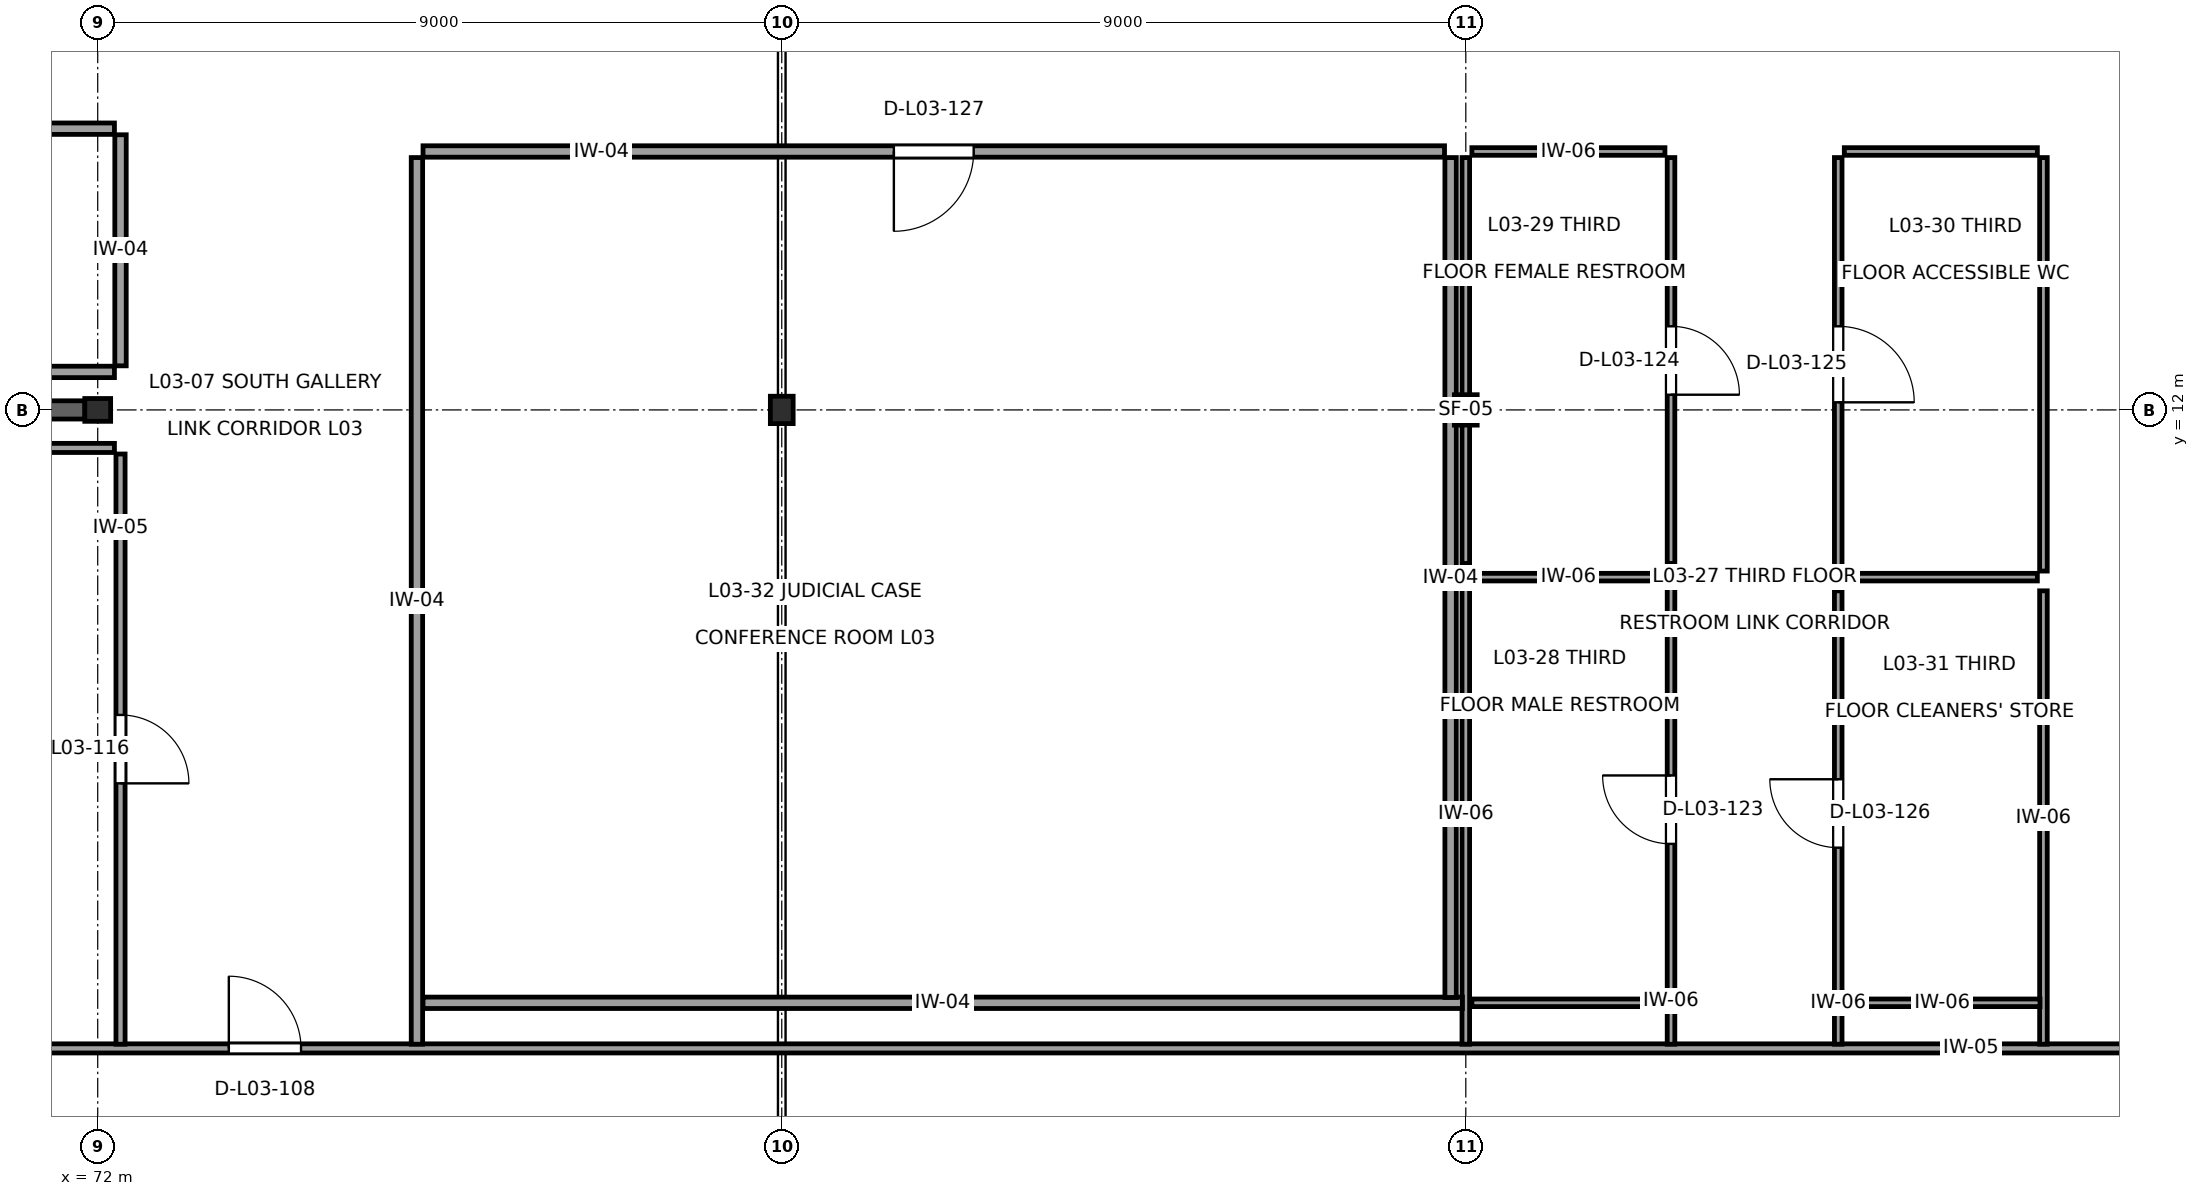
"""IFC4 building model, lengths in metres.
Left out: names, types, materials, properties, quantities, classifications, styles, units other than length and angle.
Written with IfcOpenShell. Run it as: python <this file> out.ifc"""

import sys

from ifc_helpers import new_model, si_unit, direction, frame, frame_2d, origin, origin_2d, place, context, subcontext, project, spatial, rectangle, i_section, extrude, element, fill, save


model = new_model("IFC4")
c1 = context("Model", 3, precision=1e-05, world=origin(), true_north=direction((0.0, 1.0)))
c2 = subcontext(c1, "Body", "Model", "MODEL_VIEW")
j1 = project(units=[si_unit("LENGTHUNIT", "METRE"), si_unit("PLANEANGLEUNIT", "RADIAN")], contexts=[c1])
p1 = place(None, origin())
s1 = spatial("IfcSite", under=j1, at=p1, CompositionType="ELEMENT")
p2 = place(p1, origin())
s2 = spatial("IfcBuilding", under=s1, at=p2, CompositionType="ELEMENT")
p3 = place(p2, frame((0.0, 0.0, 14.4)))
s3 = spatial("IfcBuildingStorey", under=s2, at=p3, CompositionType="ELEMENT", Elevation=14.4)
p4 = place(p3, frame((72.0, 12.0, 0.0), z_axis=(0.0, 0.0, 1.0), x_axis=(0.0, 1.0, 0.0)))
e1 = element("IfcColumn", 1, at=p4, inside=s3, PredefinedType="COLUMN", context=c2, shape_type="SweptSolid", body=[
    extrude(i_section(OverallWidth=0.3, OverallDepth=0.34, WebThickness=0.012, FlangeThickness=0.021, at=origin_2d()), origin(), (0.0, 0.0, 1.0), 4.5),
])
p5 = place(p3, frame((81.0, 12.0, 0.0), z_axis=(0.0, 0.0, 1.0), x_axis=(1.0, 0.0, 0.0)))
e2 = element("IfcColumn", 2, at=p5, inside=s3, PredefinedType="COLUMN", context=c2, shape_type="SweptSolid", body=[
    extrude(i_section(OverallWidth=0.3, OverallDepth=0.36, WebThickness=0.012, FlangeThickness=0.022, at=origin_2d()), origin(), (0.0, 0.0, 1.0), 4.5),
])
p6 = place(p3, frame((90.0, 12.0, 0.0), z_axis=(0.0, 0.0, 1.0), x_axis=(1.0, 0.0, 0.0)))
e3 = element("IfcColumn", 3, at=p6, inside=s3, PredefinedType="COLUMN", context=c2, shape_type="SweptSolid", body=[
    extrude(i_section(OverallWidth=0.3, OverallDepth=0.4, WebThickness=0.013, FlangeThickness=0.024, at=origin_2d()), origin(), (0.0, 0.0, 1.0), 4.5),
])
p7 = place(p3, frame((63.008, 12.0, 0.0), z_axis=(0.0, 0.0, 1.0), x_axis=(1.0, 0.0, 0.0)))
e4 = element("IfcWall", 4, at=p7, inside=s3, PredefinedType="SHEAR", context=c2, shape_type="SweptSolid", body=[
    extrude(rectangle(XDim=8.824, YDim=0.24, at=frame_2d((4.412, 0.0))), origin(), (0.0, 0.0, 1.0), 3.575),
])
p8 = place(p3, frame((53.87, 3.6, 0.0), z_axis=(0.0, 0.0, 1.0), x_axis=(1.0, 0.0, 0.0)))
e5 = element("IfcWall", 5, at=p8, inside=s3, PredefinedType="PARTITIONING", context=c2, shape_type="SweptSolid", body=[
    extrude(rectangle(XDim=63.25, YDim=0.12, at=frame_2d((31.625, 0.0))), origin(), (0.0, 0.0, 1.0), 4.14),
])
p9 = place(p8, frame((19.855, 0.0, 0.0)))
e6 = element("IfcOpeningElement", 6, at=p9, cuts=e5, PredefinedType="OPENING", context=c2, shape_type="SweptSolid", body=[
    extrude(rectangle(XDim=0.95, YDim=2.15, at=frame_2d((0.475, 1.075))), frame((0.0, 0.075, 0.0), z_axis=(0.0, -1.0, 0.0), x_axis=(1.0, 0.0, 0.0)), (0.0, 0.0, 1.0), 0.15),
])
p10 = place(p3, frame((62.795, 11.5, 0.0), z_axis=(0.0, 0.0, 1.0), x_axis=(1.0, 0.0, 0.0)))
e7 = element("IfcWall", 7, at=p10, inside=s3, PredefinedType="PARTITIONING", context=c2, shape_type="SweptSolid", body=[
    extrude(rectangle(XDim=9.425, YDim=0.12, at=frame_2d((4.712, 0.0))), origin(), (0.0, 0.0, 1.0), 4.14),
])
p11 = place(p3, frame((72.3, 11.42, 0.0), z_axis=(0.0, 0.0, 1.0), x_axis=(0.0, -1.0, 0.0)))
e8 = element("IfcWall", 8, at=p11, inside=s3, PredefinedType="PARTITIONING", context=c2, shape_type="SweptSolid", body=[
    extrude(rectangle(XDim=7.765, YDim=0.12, at=frame_2d((3.882, 0.0))), origin(), (0.0, 0.0, 1.0), 4.14),
])
p12 = place(p11, frame((3.433, 0.0, 0.0)))
e9 = element("IfcOpeningElement", 9, at=p12, cuts=e8, PredefinedType="OPENING", context=c2, shape_type="SweptSolid", body=[
    extrude(rectangle(XDim=0.9, YDim=2.1, at=frame_2d((0.45, 1.05))), frame((0.0, 0.075, 0.0), z_axis=(0.0, -1.0, 0.0), x_axis=(1.0, 0.0, 0.0)), (0.0, 0.0, 1.0), 0.15),
])
p13 = place(p3, frame((62.795, 15.7, 0.0), z_axis=(0.0, 0.0, 1.0), x_axis=(1.0, 0.0, 0.0)))
e10 = element("IfcWall", 10, at=p13, inside=s3, PredefinedType="PARTITIONING", context=c2, shape_type="SweptSolid", body=[
    extrude(rectangle(XDim=9.425, YDim=0.15, at=frame_2d((4.712, 0.0))), origin(), (0.0, 0.0, 1.0), 4.14),
])
p14 = place(p13, frame((4.187, 0.0, 0.0)))
e11 = element("IfcOpeningElement", 11, at=p14, cuts=e10, PredefinedType="OPENING", context=c2, shape_type="SweptSolid", body=[
    extrude(rectangle(XDim=1.05, YDim=2.25, at=frame_2d((0.525, 1.125))), frame((0.0, 0.09, 0.0), z_axis=(0.0, -1.0, 0.0), x_axis=(1.0, 0.0, 0.0)), (0.0, 0.0, 1.0), 0.18),
])
p15 = place(p3, frame((72.3, 15.62, 0.0), z_axis=(0.0, 0.0, 1.0), x_axis=(0.0, -1.0, 0.0)))
e12 = element("IfcWall", 12, at=p15, inside=s3, PredefinedType="PARTITIONING", context=c2, shape_type="SweptSolid", body=[
    extrude(rectangle(XDim=3.04, YDim=0.15, at=frame_2d((1.52, 0.0))), origin(), (0.0, 0.0, 1.0), 4.14),
])
p16 = place(p3, frame((72.22, 12.5, 0.0), z_axis=(0.0, 0.0, 1.0), x_axis=(-1.0, 0.0, 0.0)))
e13 = element("IfcWall", 13, at=p16, inside=s3, PredefinedType="PARTITIONING", context=c2, shape_type="SweptSolid", body=[
    extrude(rectangle(XDim=9.425, YDim=0.15, at=frame_2d((4.712, 0.0))), origin(), (0.0, 0.0, 1.0), 4.14),
])
p17 = place(p3, frame((92.62, 4.2, 0.0), z_axis=(0.0, 0.0, 1.0), x_axis=(-1.0, 0.0, 0.0)))
e14 = element("IfcWall", 14, at=p17, inside=s3, PredefinedType="PARTITIONING", context=c2, shape_type="SweptSolid", body=[
    extrude(rectangle(XDim=2.54, YDim=0.1, at=frame_2d((1.27, 0.0))), origin(), (0.0, 0.0, 1.0), 4.14),
])
p18 = place(p3, frame((90.0, 3.655, 0.0), z_axis=(0.0, 0.0, 1.0), x_axis=(0.0, 1.0, 0.0)))
e15 = element("IfcWall", 15, at=p18, inside=s3, PredefinedType="PARTITIONING", context=c2, shape_type="SweptSolid", body=[
    extrude(rectangle(XDim=6.065, YDim=0.1, at=frame_2d((3.032, 0.0))), origin(), (0.0, 0.0, 1.0), 3.735),
])
p19 = place(p3, frame((90.08, 9.8, 0.0), z_axis=(0.0, 0.0, 1.0), x_axis=(1.0, 0.0, 0.0)))
e16 = element("IfcWall", 16, at=p19, inside=s3, PredefinedType="PARTITIONING", context=c2, shape_type="SweptSolid", body=[
    extrude(rectangle(XDim=2.54, YDim=0.1, at=frame_2d((1.27, 0.0))), origin(), (0.0, 0.0, 1.0), 4.14),
])
p20 = place(p3, frame((92.7, 9.72, 0.0), z_axis=(0.0, 0.0, 1.0), x_axis=(0.0, -1.0, 0.0)))
e17 = element("IfcWall", 17, at=p20, inside=s3, PredefinedType="PARTITIONING", context=c2, shape_type="SweptSolid", body=[
    extrude(rectangle(XDim=6.065, YDim=0.1, at=frame_2d((3.032, 0.0))), origin(), (0.0, 0.0, 1.0), 4.14),
])
p21 = place(p20, frame((2.529, 0.0, 0.0)))
e18 = element("IfcOpeningElement", 18, at=p21, cuts=e17, PredefinedType="OPENING", context=c2, shape_type="SweptSolid", body=[
    extrude(rectangle(XDim=0.9, YDim=2.05, at=frame_2d((0.45, 1.025))), frame((0.0, 0.065, 0.0), z_axis=(0.0, -1.0, 0.0), x_axis=(1.0, 0.0, 0.0)), (0.0, 0.0, 1.0), 0.13),
])
p22 = place(p3, frame((90.08, 15.4, 0.0), z_axis=(0.0, 0.0, 1.0), x_axis=(1.0, 0.0, 0.0)))
e19 = element("IfcWall", 19, at=p22, inside=s3, PredefinedType="PARTITIONING", context=c2, shape_type="SweptSolid", body=[
    extrude(rectangle(XDim=2.54, YDim=0.1, at=frame_2d((1.27, 0.0))), origin(), (0.0, 0.0, 1.0), 4.14),
])
p23 = place(p3, frame((92.7, 15.32, 0.0), z_axis=(0.0, 0.0, 1.0), x_axis=(0.0, -1.0, 0.0)))
e20 = element("IfcWall", 20, at=p23, inside=s3, PredefinedType="PARTITIONING", context=c2, shape_type="SweptSolid", body=[
    extrude(rectangle(XDim=5.34, YDim=0.1, at=frame_2d((2.67, 0.0))), origin(), (0.0, 0.0, 1.0), 4.14),
])
p24 = place(p23, frame((2.22, 0.0, 0.0)))
e21 = element("IfcOpeningElement", 21, at=p24, cuts=e20, PredefinedType="OPENING", context=c2, shape_type="SweptSolid", body=[
    extrude(rectangle(XDim=0.9, YDim=2.05, at=frame_2d((0.45, 1.025))), frame((0.0, 0.065, 0.0), z_axis=(0.0, -1.0, 0.0), x_axis=(1.0, 0.0, 0.0)), (0.0, 0.0, 1.0), 0.13),
])
p25 = place(p3, frame((90.0, 9.98, 0.0), z_axis=(0.0, 0.0, 1.0), x_axis=(0.0, 1.0, 0.0)))
e22 = element("IfcWall", 22, at=p25, inside=s3, PredefinedType="PARTITIONING", context=c2, shape_type="SweptSolid", body=[
    extrude(rectangle(XDim=5.34, YDim=0.1, at=frame_2d((2.67, 0.0))), origin(), (0.0, 0.0, 1.0), 3.735),
])
p26 = place(p3, frame((94.98, 15.4, 0.0), z_axis=(0.0, 0.0, 1.0), x_axis=(1.0, 0.0, 0.0)))
e23 = element("IfcWall", 23, at=p26, inside=s3, PredefinedType="PARTITIONING", context=c2, shape_type="SweptSolid", body=[
    extrude(rectangle(XDim=2.54, YDim=0.1, at=frame_2d((1.27, 0.0))), origin(), (0.0, 0.0, 1.0), 4.14),
])
p27 = place(p3, frame((97.6, 15.32, 0.0), z_axis=(0.0, 0.0, 1.0), x_axis=(0.0, -1.0, 0.0)))
e24 = element("IfcWall", 24, at=p27, inside=s3, PredefinedType="PARTITIONING", context=c2, shape_type="SweptSolid", body=[
    extrude(rectangle(XDim=5.44, YDim=0.1, at=frame_2d((2.72, 0.0))), origin(), (0.0, 0.0, 1.0), 4.14),
])
p28 = place(p3, frame((97.52, 9.8, 0.0), z_axis=(0.0, 0.0, 1.0), x_axis=(-1.0, 0.0, 0.0)))
e25 = element("IfcWall", 25, at=p28, inside=s3, PredefinedType="PARTITIONING", context=c2, shape_type="SweptSolid", body=[
    extrude(rectangle(XDim=2.54, YDim=0.1, at=frame_2d((1.27, 0.0))), origin(), (0.0, 0.0, 1.0), 4.14),
])
p29 = place(p3, frame((94.9, 9.88, 0.0), z_axis=(0.0, 0.0, 1.0), x_axis=(0.0, 1.0, 0.0)))
e26 = element("IfcWall", 26, at=p29, inside=s3, PredefinedType="PARTITIONING", context=c2, shape_type="SweptSolid", body=[
    extrude(rectangle(XDim=5.44, YDim=0.1, at=frame_2d((2.72, 0.0))), origin(), (0.0, 0.0, 1.0), 4.14),
])
p30 = place(p29, frame((2.22, 0.0, 0.0)))
e27 = element("IfcOpeningElement", 27, at=p30, cuts=e26, PredefinedType="OPENING", context=c2, shape_type="SweptSolid", body=[
    extrude(rectangle(XDim=1.0, YDim=2.1, at=frame_2d((0.5, 1.05))), frame((0.0, 0.065, 0.0), z_axis=(0.0, -1.0, 0.0), x_axis=(1.0, 0.0, 0.0)), (0.0, 0.0, 1.0), 0.13),
])
p31 = place(p3, frame((97.6, 9.62, 0.0), z_axis=(0.0, 0.0, 1.0), x_axis=(0.0, -1.0, 0.0)))
e28 = element("IfcWall", 28, at=p31, inside=s3, PredefinedType="PARTITIONING", context=c2, shape_type="SweptSolid", body=[
    extrude(rectangle(XDim=5.965, YDim=0.1, at=frame_2d((2.982, 0.0))), origin(), (0.0, 0.0, 1.0), 4.14),
])
p32 = place(p3, frame((97.555, 4.2, 0.0), z_axis=(0.0, 0.0, 1.0), x_axis=(-1.0, 0.0, 0.0)))
e29 = element("IfcWall", 29, at=p32, inside=s3, PredefinedType="PARTITIONING", context=c2, shape_type="SweptSolid", body=[
    extrude(rectangle(XDim=2.575, YDim=0.1, at=frame_2d((1.288, 0.0))), origin(), (0.0, 0.0, 1.0), 4.14),
])
p33 = place(p3, frame((94.9, 3.655, 0.0), z_axis=(0.0, 0.0, 1.0), x_axis=(0.0, 1.0, 0.0)))
e30 = element("IfcWall", 30, at=p33, inside=s3, PredefinedType="PARTITIONING", context=c2, shape_type="SweptSolid", body=[
    extrude(rectangle(XDim=5.965, YDim=0.1, at=frame_2d((2.982, 0.0))), origin(), (0.0, 0.0, 1.0), 4.14),
])
p34 = place(p33, frame((2.586, 0.0, 0.0)))
e31 = element("IfcOpeningElement", 31, at=p34, cuts=e30, PredefinedType="OPENING", context=c2, shape_type="SweptSolid", body=[
    extrude(rectangle(XDim=0.9, YDim=2.05, at=frame_2d((0.45, 1.025))), frame((0.0, 0.065, 0.0), z_axis=(0.0, -1.0, 0.0), x_axis=(1.0, 0.0, 0.0)), (0.0, 0.0, 1.0), 0.13),
])
p35 = place(p3, frame((89.955, 4.2, 0.0), z_axis=(0.0, 0.0, 1.0), x_axis=(-1.0, 0.0, 0.0)))
e32 = element("IfcWall", 32, at=p35, inside=s3, PredefinedType="PARTITIONING", context=c2, shape_type="SweptSolid", body=[
    extrude(rectangle(XDim=13.675, YDim=0.15, at=frame_2d((6.837, 0.0))), origin(), (0.0, 0.0, 1.0), 4.14),
])
p36 = place(p3, frame((76.2, 3.655, 0.0), z_axis=(0.0, 0.0, 1.0), x_axis=(0.0, 1.0, 0.0)))
e33 = element("IfcWall", 33, at=p36, inside=s3, PredefinedType="PARTITIONING", context=c2, shape_type="SweptSolid", body=[
    extrude(rectangle(XDim=11.665, YDim=0.15, at=frame_2d((5.833, 0.0))), origin(), (0.0, 0.0, 1.0), 4.14),
])
p37 = place(p3, frame((76.28, 15.4, 0.0), z_axis=(0.0, 0.0, 1.0), x_axis=(1.0, 0.0, 0.0)))
e34 = element("IfcWall", 34, at=p37, inside=s3, PredefinedType="PARTITIONING", context=c2, shape_type="SweptSolid", body=[
    extrude(rectangle(XDim=13.44, YDim=0.15, at=frame_2d((6.72, 0.0))), origin(), (0.0, 0.0, 1.0), 4.14),
])
p38 = place(p37, frame((6.195, 0.0, 0.0)))
e35 = element("IfcOpeningElement", 35, at=p38, cuts=e34, PredefinedType="OPENING", context=c2, shape_type="SweptSolid", body=[
    extrude(rectangle(XDim=1.05, YDim=2.25, at=frame_2d((0.525, 1.125))), frame((0.0, 0.09, 0.0), z_axis=(0.0, -1.0, 0.0), x_axis=(1.0, 0.0, 0.0)), (0.0, 0.0, 1.0), 0.18),
])
p39 = place(p3, frame((89.8, 15.32, 0.0), z_axis=(0.0, 0.0, 1.0), x_axis=(0.0, -1.0, 0.0)))
e36 = element("IfcWall", 36, at=p39, inside=s3, PredefinedType="PARTITIONING", context=c2, shape_type="SweptSolid", body=[
    extrude(rectangle(XDim=11.05, YDim=0.15, at=frame_2d((5.525, 0.0))), origin(), (0.0, 0.0, 1.0), 3.735),
])
p40 = place(p9, origin())
e37 = element("IfcDoor", 37, at=p40, inside=s3, OperationType="SINGLE_SWING_LEFT", PredefinedType="DOOR", context=c2, shape_type="SweptSolid", body=[
    extrude(rectangle(XDim=0.95, YDim=2.15, at=frame_2d((0.475, 1.075))), frame((0.0, 0.025, 0.0), z_axis=(0.0, -1.0, 0.0), x_axis=(1.0, 0.0, 0.0)), (0.0, 0.0, 1.0), 0.05),
])
fill(e6, e37)
p41 = place(p12, origin())
e38 = element("IfcDoor", 38, at=p41, inside=s3, OperationType="SINGLE_SWING_RIGHT", PredefinedType="DOOR", context=c2, shape_type="SweptSolid", body=[
    extrude(rectangle(XDim=0.9, YDim=2.1, at=frame_2d((0.45, 1.05))), frame((0.0, 0.025, 0.0), z_axis=(0.0, -1.0, 0.0), x_axis=(1.0, 0.0, 0.0)), (0.0, 0.0, 1.0), 0.05),
])
fill(e9, e38)
p42 = place(p21, frame((0.9, 0.0, 0.0), z_axis=(0.0, 0.0, 1.0), x_axis=(-1.0, 0.0, 0.0)))
e39 = element("IfcDoor", 39, at=p42, inside=s3, OperationType="SINGLE_SWING_LEFT", PredefinedType="DOOR", context=c2, shape_type="SweptSolid", body=[
    extrude(rectangle(XDim=0.9, YDim=2.05, at=frame_2d((0.45, 1.025))), frame((0.0, 0.025, 0.0), z_axis=(0.0, -1.0, 0.0), x_axis=(1.0, 0.0, 0.0)), (0.0, 0.0, 1.0), 0.05),
])
fill(e18, e39)
p43 = place(p24, origin())
e40 = element("IfcDoor", 40, at=p43, inside=s3, OperationType="SINGLE_SWING_RIGHT", PredefinedType="DOOR", context=c2, shape_type="SweptSolid", body=[
    extrude(rectangle(XDim=0.9, YDim=2.05, at=frame_2d((0.45, 1.025))), frame((0.0, 0.025, 0.0), z_axis=(0.0, -1.0, 0.0), x_axis=(1.0, 0.0, 0.0)), (0.0, 0.0, 1.0), 0.05),
])
fill(e21, e40)
p44 = place(p30, frame((1.0, 0.0, 0.0), z_axis=(0.0, 0.0, 1.0), x_axis=(-1.0, 0.0, 0.0)))
e41 = element("IfcDoor", 41, at=p44, inside=s3, OperationType="SINGLE_SWING_LEFT", PredefinedType="DOOR", context=c2, shape_type="SweptSolid", body=[
    extrude(rectangle(XDim=1.0, YDim=2.1, at=frame_2d((0.5, 1.05))), frame((0.0, 0.025, 0.0), z_axis=(0.0, -1.0, 0.0), x_axis=(1.0, 0.0, 0.0)), (0.0, 0.0, 1.0), 0.05),
])
fill(e27, e41)
p45 = place(p34, origin())
e42 = element("IfcDoor", 42, at=p45, inside=s3, OperationType="SINGLE_SWING_RIGHT", PredefinedType="DOOR", context=c2, shape_type="SweptSolid", body=[
    extrude(rectangle(XDim=0.9, YDim=2.05, at=frame_2d((0.45, 1.025))), frame((0.0, 0.025, 0.0), z_axis=(0.0, -1.0, 0.0), x_axis=(1.0, 0.0, 0.0)), (0.0, 0.0, 1.0), 0.05),
])
fill(e31, e42)
p46 = place(p38, frame((1.05, 0.0, 0.0), z_axis=(0.0, 0.0, 1.0), x_axis=(-1.0, 0.0, 0.0)))
e43 = element("IfcDoor", 43, at=p46, inside=s3, OperationType="SINGLE_SWING_LEFT", PredefinedType="DOOR", context=c2, shape_type="SweptSolid", body=[
    extrude(rectangle(XDim=1.05, YDim=2.25, at=frame_2d((0.525, 1.125))), frame((0.0, 0.025, 0.0), z_axis=(0.0, -1.0, 0.0), x_axis=(1.0, 0.0, 0.0)), (0.0, 0.0, 1.0), 0.05),
])
fill(e35, e43)
save(model, sys.argv[1])
